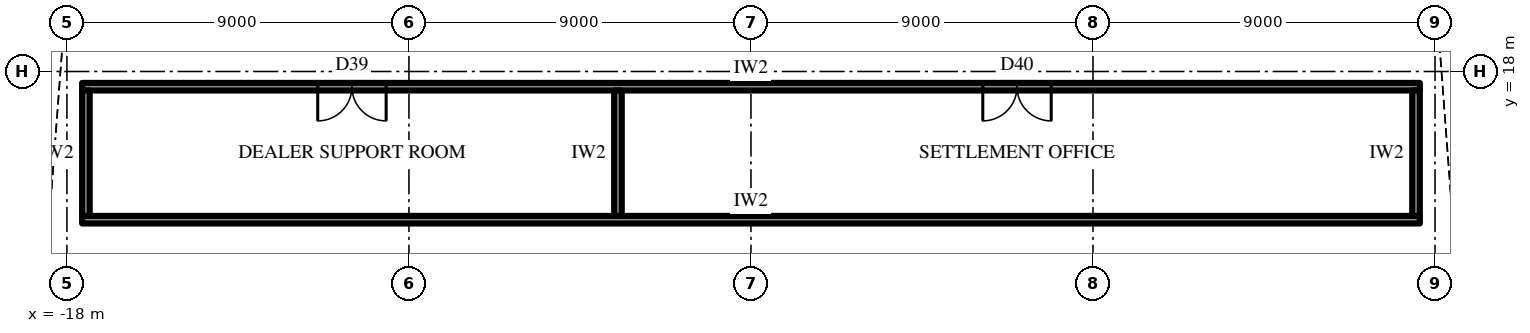
"""IFC4 building model, lengths in metres.
Left out: names, types, materials, properties, quantities, classifications, styles, units other than length and angle.
Written with IfcOpenShell. Run it as: python <this file> out.ifc"""

import sys

from ifc_helpers import new_model, si_unit, direction, frame, frame_2d, origin, place, context, subcontext, project, spatial, rectangle, extrude, element, fill, save


model = new_model("IFC4")
c1 = context("Model", 3, precision=1e-05, world=origin(), true_north=direction((0.0, 1.0)))
c2 = subcontext(c1, "Body", "Model", "MODEL_VIEW")
j1 = project(units=[si_unit("LENGTHUNIT", "METRE"), si_unit("PLANEANGLEUNIT", "RADIAN")], contexts=[c1])
p1 = place(None, origin())
s1 = spatial("IfcSite", under=j1, at=p1, CompositionType="ELEMENT")
p2 = place(p1, origin())
s2 = spatial("IfcBuilding", under=s1, at=p2, CompositionType="ELEMENT")
p3 = place(p2, frame((0.0, 0.0, 144.7)))
s3 = spatial("IfcBuildingStorey", under=s2, at=p3, CompositionType="ELEMENT", Elevation=144.7)
p4 = place(p3, frame((-17.6, 14.1, 0.0), z_axis=(0.0, 0.0, 1.0), x_axis=(1.0, 0.0, 0.0)))
e1 = element("IfcWall", 1, at=p4, inside=s3, PredefinedType="PARTITIONING", context=c2, shape_type="SweptSolid", body=[
    extrude(rectangle(XDim=35.2, YDim=0.2, at=frame_2d((17.6, 0.0))), origin(), (0.0, 0.0, 1.0), 4.0),
])
p5 = place(p3, frame((-17.6, 17.6, 0.0), z_axis=(0.0, 0.0, 1.0), x_axis=(1.0, 0.0, 0.0)))
e2 = element("IfcWall", 2, at=p5, inside=s3, PredefinedType="PARTITIONING", context=c2, shape_type="SweptSolid", body=[
    extrude(rectangle(XDim=35.2, YDim=0.2, at=frame_2d((17.6, 0.0))), origin(), (0.0, 0.0, 1.0), 4.0),
])
p6 = place(p5, frame((6.2, 0.0, 0.0)))
e3 = element("IfcOpeningElement", 3, at=p6, cuts=e2, PredefinedType="OPENING", context=c2, shape_type="SweptSolid", body=[
    extrude(rectangle(XDim=1.8, YDim=2.4, at=frame_2d((0.9, 1.2))), frame((0.0, 0.11, 0.0), z_axis=(0.0, -1.0, 0.0), x_axis=(1.0, 0.0, 0.0)), (0.0, 0.0, 1.0), 0.22),
])
p7 = place(p5, frame((23.7, 0.0, 0.0)))
e4 = element("IfcOpeningElement", 4, at=p7, cuts=e2, PredefinedType="OPENING", context=c2, shape_type="SweptSolid", body=[
    extrude(rectangle(XDim=1.8, YDim=2.4, at=frame_2d((0.9, 1.2))), frame((0.0, 0.11, 0.0), z_axis=(0.0, -1.0, 0.0), x_axis=(1.0, 0.0, 0.0)), (0.0, 0.0, 1.0), 0.22),
])
for number, where, z_axis, x_axis in (
    (5, (-17.5, 14.2, 0.0), (0.0, 0.0, 1.0), (0.0, 1.0, 0.0)),
    (6, (-3.5, 14.2, 0.0), (0.0, 0.0, 1.0), (0.0, 1.0, 0.0)),
    (7, (17.5, 14.2, 0.0), (0.0, 0.0, 1.0), (0.0, 1.0, 0.0)),
):
    element("IfcWall", number, at=place(p3, frame(where, z_axis=z_axis, x_axis=x_axis)), inside=s3, PredefinedType="PARTITIONING", context=c2, shape_type="SweptSolid", body=[
        extrude(rectangle(XDim=3.3, YDim=0.2, at=frame_2d((1.65, 0.0))), origin(), (0.0, 0.0, 1.0), 4.0),
    ])
p8 = place(p6, frame((1.8, 0.0, 0.0), z_axis=(0.0, 0.0, 1.0), x_axis=(-1.0, 0.0, 0.0)))
e8 = element("IfcDoor", 8, at=p8, inside=s3, OperationType="DOUBLE_DOOR_SINGLE_SWING", PredefinedType="DOOR", context=c2, shape_type="SweptSolid", body=[
    extrude(rectangle(XDim=1.8, YDim=2.4, at=frame_2d((0.9, 1.2))), frame((0.0, 0.025, 0.0), z_axis=(0.0, -1.0, 0.0), x_axis=(1.0, 0.0, 0.0)), (0.0, 0.0, 1.0), 0.05),
])
fill(e3, e8)
p9 = place(p7, frame((1.8, 0.0, 0.0), z_axis=(0.0, 0.0, 1.0), x_axis=(-1.0, 0.0, 0.0)))
e9 = element("IfcDoor", 9, at=p9, inside=s3, OperationType="DOUBLE_DOOR_SINGLE_SWING", PredefinedType="DOOR", context=c2, shape_type="SweptSolid", body=[
    extrude(rectangle(XDim=1.8, YDim=2.4, at=frame_2d((0.9, 1.2))), frame((0.0, 0.025, 0.0), z_axis=(0.0, -1.0, 0.0), x_axis=(1.0, 0.0, 0.0)), (0.0, 0.0, 1.0), 0.05),
])
fill(e4, e9)
save(model, sys.argv[1])
